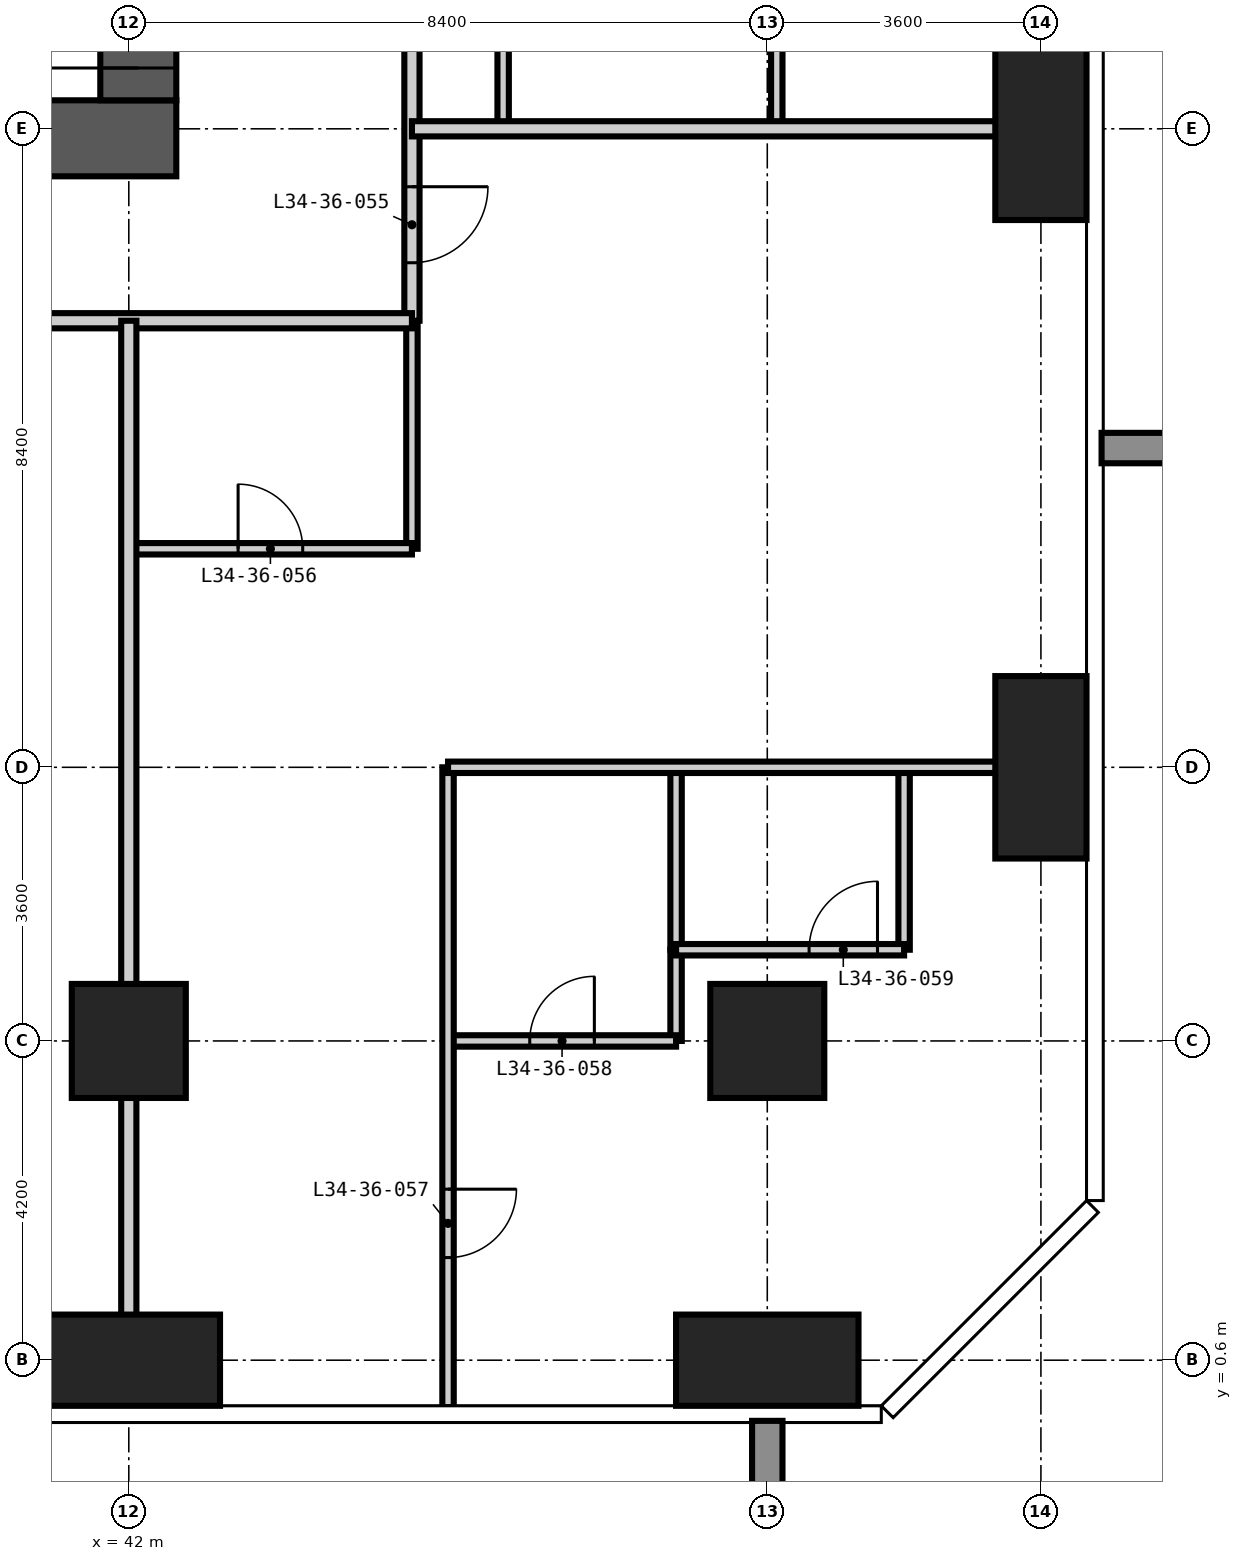
"""IFC4 building model, lengths in metres.
Left out: names, types, materials, properties, quantities, classifications, styles, units other than length and angle.
Written with IfcOpenShell. Run it as: python <this file> out.ifc"""

import sys

from ifc_helpers import new_model, si_unit, direction, frame, frame_2d, origin, origin_2d, place, context, subcontext, project, spatial, rectangle, extrude, element, fill, save


model = new_model("IFC4")
c1 = context("Model", 3, precision=1e-05, world=origin(), true_north=direction((0.0, 1.0)))
c2 = subcontext(c1, "Body", "Model", "MODEL_VIEW")
j1 = project(units=[si_unit("LENGTHUNIT", "METRE"), si_unit("PLANEANGLEUNIT", "RADIAN")], contexts=[c1])
p1 = place(None, origin())
s1 = spatial("IfcSite", under=j1, at=p1, CompositionType="ELEMENT")
p2 = place(p1, origin())
s2 = spatial("IfcBuilding", under=s1, at=p2, CompositionType="ELEMENT")
p3 = place(p2, frame((0.0, 0.0, 133.2)))
s3 = spatial("IfcBuildingStorey", under=s2, at=p3, CompositionType="ELEMENT", Elevation=133.2)
p4 = place(p3, frame((42.0, 0.6, -0.35), z_axis=(0.0, 0.0, 1.0), x_axis=(1.0, 0.0, 0.0)))
e1 = element("IfcColumn", 1, at=p4, inside=s3, PredefinedType="COLUMN", context=c2, shape_type="SweptSolid", body=[
    extrude(rectangle(XDim=2.4, YDim=1.2, at=origin_2d()), origin(), (0.0, 0.0, 1.0), 3.6),
])
p5 = place(p3, frame((42.0, 4.8, -0.35), z_axis=(0.0, 0.0, 1.0), x_axis=(1.0, 0.0, 0.0)))
e2 = element("IfcColumn", 2, at=p5, inside=s3, PredefinedType="COLUMN", context=c2, shape_type="SweptSolid", body=[
    extrude(rectangle(XDim=1.5, YDim=1.5, at=origin_2d()), origin(), (0.0, 0.0, 1.0), 3.6),
])
p6 = place(p3, frame((50.4, 0.6, -0.35), z_axis=(0.0, 0.0, 1.0), x_axis=(1.0, 0.0, 0.0)))
e3 = element("IfcColumn", 3, at=p6, inside=s3, PredefinedType="COLUMN", context=c2, shape_type="SweptSolid", body=[
    extrude(rectangle(XDim=2.4, YDim=1.2, at=origin_2d()), origin(), (0.0, 0.0, 1.0), 3.6),
])
p7 = place(p3, frame((50.4, 4.8, -0.35), z_axis=(0.0, 0.0, 1.0), x_axis=(1.0, 0.0, 0.0)))
e4 = element("IfcColumn", 4, at=p7, inside=s3, PredefinedType="COLUMN", context=c2, shape_type="SweptSolid", body=[
    extrude(rectangle(XDim=1.5, YDim=1.5, at=origin_2d()), origin(), (0.0, 0.0, 1.0), 3.6),
])
for number, where, z_axis, x_axis in (
    (5, (54.0, 8.4, -0.35), (0.0, 0.0, 1.0), (1.0, 0.0, 0.0)),
    (6, (54.0, 16.8, -0.35), (0.0, 0.0, 1.0), (1.0, 0.0, 0.0)),
):
    element("IfcColumn", number, at=place(p3, frame(where, z_axis=z_axis, x_axis=x_axis)), inside=s3, PredefinedType="COLUMN", context=c2, shape_type="SweptSolid", body=[
        extrude(rectangle(XDim=1.2, YDim=2.4, at=origin_2d()), origin(), (0.0, 0.0, 1.0), 3.6),
    ])
p8 = place(p3, frame((16.175, 16.675, -0.35), z_axis=(0.0, 0.0, 1.0), x_axis=(1.0, 0.0, 0.0)))
e7 = element("IfcWall", 7, at=p8, inside=s3, PredefinedType="SHEAR", context=c2, shape_type="SweptSolid", body=[
    extrude(rectangle(XDim=26.45, YDim=1.0, at=frame_2d((13.225, 0.0))), origin(), (0.0, 0.0, 1.0), 3.6),
])
p9 = place(p8, frame((12.725, 0.0, 0.35)))
e8 = element("IfcOpeningElement", 8, at=p9, cuts=e7, PredefinedType="OPENING", context=c2, shape_type="SweptSolid", body=[
    extrude(rectangle(XDim=1.0, YDim=2.1, at=frame_2d((0.5, 1.05))), frame((0.0, 0.51, 0.0), z_axis=(0.0, -1.0, 0.0), x_axis=(1.0, 0.0, 0.0)), (0.0, 0.0, 1.0), 1.02),
])
p10 = place(p8, frame((19.025, 0.0, 0.35)))
e9 = element("IfcOpeningElement", 9, at=p10, cuts=e7, PredefinedType="OPENING", context=c2, shape_type="SweptSolid", body=[
    extrude(rectangle(XDim=1.0, YDim=2.1, at=frame_2d((0.5, 1.05))), frame((0.0, 0.51, 0.0), z_axis=(0.0, -1.0, 0.0), x_axis=(1.0, 0.0, 0.0)), (0.0, 0.0, 1.0), 1.02),
])
p11 = place(p3, frame((42.125, 17.175, -0.35), z_axis=(0.0, 0.0, 1.0), x_axis=(0.0, 1.0, 0.0)))
e10 = element("IfcWall", 10, at=p11, inside=s3, PredefinedType="SHEAR", context=c2, shape_type="SweptSolid", body=[
    extrude(rectangle(XDim=24.45, YDim=1.0, at=frame_2d((12.225, 0.0))), origin(), (0.0, 0.0, 1.0), 3.6),
])
p12 = place(p11, frame((0.425, 0.0, 0.35)))
e11 = element("IfcOpeningElement", 11, at=p12, cuts=e10, PredefinedType="OPENING", context=c2, shape_type="SweptSolid", body=[
    extrude(rectangle(XDim=1.2, YDim=2.2, at=frame_2d((0.6, 1.1))), frame((0.0, 0.51, 0.0), z_axis=(0.0, -1.0, 0.0), x_axis=(1.0, 0.0, 0.0)), (0.0, 0.0, 1.0), 1.02),
])
p13 = place(p11, frame((11.325, 0.0, 0.35)))
e12 = element("IfcOpeningElement", 12, at=p13, cuts=e10, PredefinedType="OPENING", context=c2, shape_type="SweptSolid", body=[
    extrude(rectangle(XDim=1.8, YDim=2.2, at=frame_2d((0.9, 1.1))), frame((0.0, 0.51, 0.0), z_axis=(0.0, -1.0, 0.0), x_axis=(1.0, 0.0, 0.0)), (0.0, 0.0, 1.0), 1.02),
])
p14 = place(p11, frame((20.125, 0.0, 0.35)))
e13 = element("IfcOpeningElement", 13, at=p14, cuts=e10, PredefinedType="OPENING", context=c2, shape_type="SweptSolid", body=[
    extrude(rectangle(XDim=1.0, YDim=2.1, at=frame_2d((0.5, 1.05))), frame((0.0, 0.51, 0.0), z_axis=(0.0, -1.0, 0.0), x_axis=(1.0, 0.0, 0.0)), (0.0, 0.0, 1.0), 1.02),
])
p15 = place(p3, frame((45.725, 11.275, 0.0), z_axis=(0.0, 0.0, 1.0), x_axis=(0.0, 1.0, 0.0)))
e14 = element("IfcWall", 14, at=p15, inside=s3, PredefinedType="PARTITIONING", context=c2, shape_type="SweptSolid", body=[
    extrude(rectangle(XDim=3.0, YDim=0.15, at=frame_2d((1.5, 0.0))), origin(), (0.0, 0.0, 1.0), 3.25),
])
p16 = place(p3, frame((46.925, 16.8, 0.0), z_axis=(0.0, 0.0, 1.0), x_axis=(0.0, 1.0, 0.0)))
e15 = element("IfcWall", 15, at=p16, inside=s3, PredefinedType="PARTITIONING", context=c2, shape_type="SweptSolid", body=[
    extrude(rectangle(XDim=2.7, YDim=0.15, at=frame_2d((1.35, 0.0))), origin(), (0.0, 0.0, 1.0), 3.25),
])
p17 = place(p3, frame((49.2, 4.8, 0.0), z_axis=(0.0, 0.0, 1.0), x_axis=(0.0, 1.0, 0.0)))
e16 = element("IfcWall", 16, at=p17, inside=s3, PredefinedType="PARTITIONING", context=c2, shape_type="SweptSolid", body=[
    extrude(rectangle(XDim=1.2, YDim=0.15, at=frame_2d((0.6, 0.0))), origin(), (0.0, 0.0, 1.0), 3.25),
])
p18 = place(p3, frame((50.525, 16.8, 0.0), z_axis=(0.0, 0.0, 1.0), x_axis=(0.0, 1.0, 0.0)))
e17 = element("IfcWall", 17, at=p18, inside=s3, PredefinedType="PARTITIONING", context=c2, shape_type="SweptSolid", body=[
    extrude(rectangle(XDim=2.7, YDim=0.15, at=frame_2d((1.35, 0.0))), origin(), (0.0, 0.0, 1.0), 3.25),
])
p19 = place(p3, frame((46.2, 4.8, 0.0), z_axis=(0.0, 0.0, 1.0), x_axis=(1.0, 0.0, 0.0)))
e18 = element("IfcWall", 18, at=p19, inside=s3, PredefinedType="PARTITIONING", context=c2, shape_type="SweptSolid", body=[
    extrude(rectangle(XDim=3.0, YDim=0.15, at=frame_2d((1.5, 0.0))), origin(), (0.0, 0.0, 1.0), 3.25),
])
p20 = place(p19, frame((1.075, 0.0, 0.0)))
e19 = element("IfcOpeningElement", 19, at=p20, cuts=e18, PredefinedType="OPENING", context=c2, shape_type="SweptSolid", body=[
    extrude(rectangle(XDim=0.85, YDim=2.1, at=frame_2d((0.425, 1.05))), frame((0.0, 0.085, 0.0), z_axis=(0.0, -1.0, 0.0), x_axis=(1.0, 0.0, 0.0)), (0.0, 0.0, 1.0), 0.17),
])
p21 = place(p3, frame((42.0, 11.275, 0.0), z_axis=(0.0, 0.0, 1.0), x_axis=(1.0, 0.0, 0.0)))
e20 = element("IfcWall", 20, at=p21, inside=s3, PredefinedType="PARTITIONING", context=c2, shape_type="SweptSolid", body=[
    extrude(rectangle(XDim=3.725, YDim=0.15, at=frame_2d((1.863, 0.0))), origin(), (0.0, 0.0, 1.0), 3.25),
])
p22 = place(p21, frame((1.438, 0.0, 0.0)))
e21 = element("IfcOpeningElement", 21, at=p22, cuts=e20, PredefinedType="OPENING", context=c2, shape_type="SweptSolid", body=[
    extrude(rectangle(XDim=0.85, YDim=2.1, at=frame_2d((0.425, 1.05))), frame((0.0, 0.085, 0.0), z_axis=(0.0, -1.0, 0.0), x_axis=(1.0, 0.0, 0.0)), (0.0, 0.0, 1.0), 0.17),
])
p23 = place(p3, frame((45.725, 45.125, 0.0), z_axis=(0.0, 0.0, 1.0), x_axis=(0.0, -1.0, 0.0)))
e22 = element("IfcWall", 22, at=p23, inside=s3, PredefinedType="PARTITIONING", context=c2, shape_type="SweptSolid", body=[
    extrude(rectangle(XDim=30.85, YDim=0.2, at=frame_2d((15.425, 0.0))), origin(), (0.0, 0.0, 1.0), 3.25),
])
p24 = place(p23, frame((21.525, 0.0, 0.0)))
e23 = element("IfcOpeningElement", 23, at=p24, cuts=e22, PredefinedType="OPENING", context=c2, shape_type="SweptSolid", body=[
    extrude(rectangle(XDim=1.0, YDim=2.2, at=frame_2d((0.5, 1.1))), frame((0.0, 0.11, 0.0), z_axis=(0.0, -1.0, 0.0), x_axis=(1.0, 0.0, 0.0)), (0.0, 0.0, 1.0), 0.22),
])
p25 = place(p23, frame((13.125, 0.0, 0.0)))
e24 = element("IfcOpeningElement", 24, at=p25, cuts=e22, PredefinedType="OPENING", context=c2, shape_type="SweptSolid", body=[
    extrude(rectangle(XDim=1.0, YDim=2.2, at=frame_2d((0.5, 1.1))), frame((0.0, 0.11, 0.0), z_axis=(0.0, -1.0, 0.0), x_axis=(1.0, 0.0, 0.0)), (0.0, 0.0, 1.0), 0.22),
])
p26 = place(p23, frame((6.825, 0.0, 0.0)))
e25 = element("IfcOpeningElement", 25, at=p26, cuts=e22, PredefinedType="OPENING", context=c2, shape_type="SweptSolid", body=[
    extrude(rectangle(XDim=1.0, YDim=2.2, at=frame_2d((0.5, 1.1))), frame((0.0, 0.11, 0.0), z_axis=(0.0, -1.0, 0.0), x_axis=(1.0, 0.0, 0.0)), (0.0, 0.0, 1.0), 0.22),
])
p27 = place(p23, frame((29.087, 0.0, 0.0)))
e26 = element("IfcOpeningElement", 26, at=p27, cuts=e22, PredefinedType="OPENING", context=c2, shape_type="SweptSolid", body=[
    extrude(rectangle(XDim=1.0, YDim=2.2, at=frame_2d((0.5, 1.1))), frame((0.0, 0.11, 0.0), z_axis=(0.0, -1.0, 0.0), x_axis=(1.0, 0.0, 0.0)), (0.0, 0.0, 1.0), 0.22),
])
p28 = place(p23, frame((1.063, 0.0, 0.0)))
e27 = element("IfcOpeningElement", 27, at=p28, cuts=e22, PredefinedType="OPENING", context=c2, shape_type="SweptSolid", body=[
    extrude(rectangle(XDim=1.0, YDim=2.2, at=frame_2d((0.5, 1.1))), frame((0.0, 0.11, 0.0), z_axis=(0.0, -1.0, 0.0), x_axis=(1.0, 0.0, 0.0)), (0.0, 0.0, 1.0), 0.22),
])
p29 = place(p3, frame((45.725, 14.275, 0.0), z_axis=(0.0, 0.0, 1.0), x_axis=(-1.0, 0.0, 0.0)))
e28 = element("IfcWall", 28, at=p29, inside=s3, PredefinedType="PARTITIONING", context=c2, shape_type="SweptSolid", body=[
    extrude(rectangle(XDim=33.125, YDim=0.2, at=frame_2d((16.562, 0.0))), origin(), (0.0, 0.0, 1.0), 3.25),
])
p30 = place(p29, frame((26.325, 0.0, 0.0)))
e29 = element("IfcOpeningElement", 29, at=p30, cuts=e28, PredefinedType="OPENING", context=c2, shape_type="SweptSolid", body=[
    extrude(rectangle(XDim=1.0, YDim=2.2, at=frame_2d((0.5, 1.1))), frame((0.0, 0.11, 0.0), z_axis=(0.0, -1.0, 0.0), x_axis=(1.0, 0.0, 0.0)), (0.0, 0.0, 1.0), 0.22),
])
p31 = place(p29, frame((21.225, 0.0, 0.0)))
e30 = element("IfcOpeningElement", 30, at=p31, cuts=e28, PredefinedType="OPENING", context=c2, shape_type="SweptSolid", body=[
    extrude(rectangle(XDim=1.0, YDim=2.2, at=frame_2d((0.5, 1.1))), frame((0.0, 0.11, 0.0), z_axis=(0.0, -1.0, 0.0), x_axis=(1.0, 0.0, 0.0)), (0.0, 0.0, 1.0), 0.22),
])
p32 = place(p29, frame((12.825, 0.0, 0.0)))
e31 = element("IfcOpeningElement", 31, at=p32, cuts=e28, PredefinedType="OPENING", context=c2, shape_type="SweptSolid", body=[
    extrude(rectangle(XDim=1.0, YDim=2.2, at=frame_2d((0.5, 1.1))), frame((0.0, 0.11, 0.0), z_axis=(0.0, -1.0, 0.0), x_axis=(1.0, 0.0, 0.0)), (0.0, 0.0, 1.0), 0.22),
])
p33 = place(p29, frame((5.325, 0.0, 0.0)))
e32 = element("IfcOpeningElement", 32, at=p33, cuts=e28, PredefinedType="OPENING", context=c2, shape_type="SweptSolid", body=[
    extrude(rectangle(XDim=1.0, YDim=2.2, at=frame_2d((0.5, 1.1))), frame((0.0, 0.11, 0.0), z_axis=(0.0, -1.0, 0.0), x_axis=(1.0, 0.0, 0.0)), (0.0, 0.0, 1.0), 0.22),
])
p34 = place(p3, frame((42.0, -0.018, 0.0), z_axis=(0.0, 0.0, 1.0), x_axis=(0.0, 1.0, 0.0)))
e33 = element("IfcWall", 33, at=p34, inside=s3, PredefinedType="PARTITIONING", context=c2, shape_type="SweptSolid", body=[
    extrude(rectangle(XDim=14.293, YDim=0.2, at=frame_2d((7.146, 0.0))), origin(), (0.0, 0.0, 1.0), 3.25),
])
p35 = place(p3, frame((45.725, 16.8, 0.0), z_axis=(0.0, 0.0, 1.0), x_axis=(1.0, 0.0, 0.0)))
e34 = element("IfcWall", 34, at=p35, inside=s3, PredefinedType="PARTITIONING", context=c2, shape_type="SweptSolid", body=[
    extrude(rectangle(XDim=8.893, YDim=0.2, at=frame_2d((4.446, 0.0))), origin(), (0.0, 0.0, 1.0), 3.25),
])
p36 = place(p3, frame((46.2, -0.018, 0.0), z_axis=(0.0, 0.0, 1.0), x_axis=(0.0, 1.0, 0.0)))
e35 = element("IfcWall", 35, at=p36, inside=s3, PredefinedType="PARTITIONING", context=c2, shape_type="SweptSolid", body=[
    extrude(rectangle(XDim=8.418, YDim=0.15, at=frame_2d((4.209, 0.0))), origin(), (0.0, 0.0, 1.0), 3.25),
])
p37 = place(p36, frame((1.968, 0.0, 0.0)))
e36 = element("IfcOpeningElement", 36, at=p37, cuts=e35, PredefinedType="OPENING", context=c2, shape_type="SweptSolid", body=[
    extrude(rectangle(XDim=0.9, YDim=2.1, at=frame_2d((0.45, 1.05))), frame((0.0, 0.085, 0.0), z_axis=(0.0, -1.0, 0.0), x_axis=(1.0, 0.0, 0.0)), (0.0, 0.0, 1.0), 0.17),
])
for number, where, z_axis, x_axis in (
    (37, (49.2, 6.0, 0.0), (0.0, 0.0, 1.0), (0.0, 1.0, 0.0)),
    (38, (52.2, 6.0, 0.0), (0.0, 0.0, 1.0), (0.0, 1.0, 0.0)),
):
    element("IfcWall", number, at=place(p3, frame(where, z_axis=z_axis, x_axis=x_axis)), inside=s3, PredefinedType="PARTITIONING", context=c2, shape_type="SweptSolid", body=[
        extrude(rectangle(XDim=2.4, YDim=0.15, at=frame_2d((1.2, 0.0))), origin(), (0.0, 0.0, 1.0), 3.25),
    ])
p38 = place(p3, frame((49.2, 6.0, 0.0), z_axis=(0.0, 0.0, 1.0), x_axis=(1.0, 0.0, 0.0)))
e39 = element("IfcWall", 39, at=p38, inside=s3, PredefinedType="PARTITIONING", context=c2, shape_type="SweptSolid", body=[
    extrude(rectangle(XDim=3.0, YDim=0.15, at=frame_2d((1.5, 0.0))), origin(), (0.0, 0.0, 1.0), 3.25),
])
p39 = place(p38, frame((1.75, 0.0, 0.0)))
e40 = element("IfcOpeningElement", 40, at=p39, cuts=e39, PredefinedType="OPENING", context=c2, shape_type="SweptSolid", body=[
    extrude(rectangle(XDim=0.9, YDim=2.1, at=frame_2d((0.45, 1.05))), frame((0.0, 0.085, 0.0), z_axis=(0.0, -1.0, 0.0), x_axis=(1.0, 0.0, 0.0)), (0.0, 0.0, 1.0), 0.17),
])
p40 = place(p3, frame((46.2, 8.4, 0.0), z_axis=(0.0, 0.0, 1.0), x_axis=(1.0, 0.0, 0.0)))
e41 = element("IfcWall", 41, at=p40, inside=s3, PredefinedType="PARTITIONING", context=c2, shape_type="SweptSolid", body=[
    extrude(rectangle(XDim=8.418, YDim=0.15, at=frame_2d((4.209, 0.0))), origin(), (0.0, 0.0, 1.0), 3.25),
])
p41 = place(p12, origin())
e42 = element("IfcDoor", 42, at=p41, inside=s3, OperationType="SINGLE_SWING_LEFT", PredefinedType="DOOR", context=c2, shape_type="SweptSolid", body=[
    extrude(rectangle(XDim=1.2, YDim=2.2, at=frame_2d((0.6, 1.1))), frame((0.0, 0.025, 0.0), z_axis=(0.0, -1.0, 0.0), x_axis=(1.0, 0.0, 0.0)), (0.0, 0.0, 1.0), 0.05),
])
fill(e11, e42)
p42 = place(p27, origin())
e43 = element("IfcDoor", 43, at=p42, inside=s3, OperationType="SINGLE_SWING_LEFT", PredefinedType="DOOR", context=c2, shape_type="SweptSolid", body=[
    extrude(rectangle(XDim=1.0, YDim=2.2, at=frame_2d((0.5, 1.1))), frame((0.0, 0.025, 0.0), z_axis=(0.0, -1.0, 0.0), x_axis=(1.0, 0.0, 0.0)), (0.0, 0.0, 1.0), 0.05),
])
fill(e26, e43)
p43 = place(p22, origin())
e44 = element("IfcDoor", 44, at=p43, inside=s3, OperationType="SINGLE_SWING_LEFT", PredefinedType="DOOR", context=c2, shape_type="SweptSolid", body=[
    extrude(rectangle(XDim=0.85, YDim=2.1, at=frame_2d((0.425, 1.05))), frame((0.0, 0.025, 0.0), z_axis=(0.0, -1.0, 0.0), x_axis=(1.0, 0.0, 0.0)), (0.0, 0.0, 1.0), 0.05),
])
fill(e21, e44)
p44 = place(p37, frame((0.9, 0.0, 0.0), z_axis=(0.0, 0.0, 1.0), x_axis=(-1.0, 0.0, 0.0)))
e45 = element("IfcDoor", 45, at=p44, inside=s3, OperationType="SINGLE_SWING_LEFT", PredefinedType="DOOR", context=c2, shape_type="SweptSolid", body=[
    extrude(rectangle(XDim=0.9, YDim=2.1, at=frame_2d((0.45, 1.05))), frame((0.0, 0.025, 0.0), z_axis=(0.0, -1.0, 0.0), x_axis=(1.0, 0.0, 0.0)), (0.0, 0.0, 1.0), 0.05),
])
fill(e36, e45)
p45 = place(p20, origin())
e46 = element("IfcDoor", 46, at=p45, inside=s3, OperationType="SINGLE_SWING_RIGHT", PredefinedType="DOOR", context=c2, shape_type="SweptSolid", body=[
    extrude(rectangle(XDim=0.85, YDim=2.1, at=frame_2d((0.425, 1.05))), frame((0.0, 0.025, 0.0), z_axis=(0.0, -1.0, 0.0), x_axis=(1.0, 0.0, 0.0)), (0.0, 0.0, 1.0), 0.05),
])
fill(e19, e46)
p46 = place(p39, origin())
e47 = element("IfcDoor", 47, at=p46, inside=s3, OperationType="SINGLE_SWING_RIGHT", PredefinedType="DOOR", context=c2, shape_type="SweptSolid", body=[
    extrude(rectangle(XDim=0.9, YDim=2.1, at=frame_2d((0.45, 1.05))), frame((0.0, 0.025, 0.0), z_axis=(0.0, -1.0, 0.0), x_axis=(1.0, 0.0, 0.0)), (0.0, 0.0, 1.0), 0.05),
])
fill(e40, e47)
save(model, sys.argv[1])
